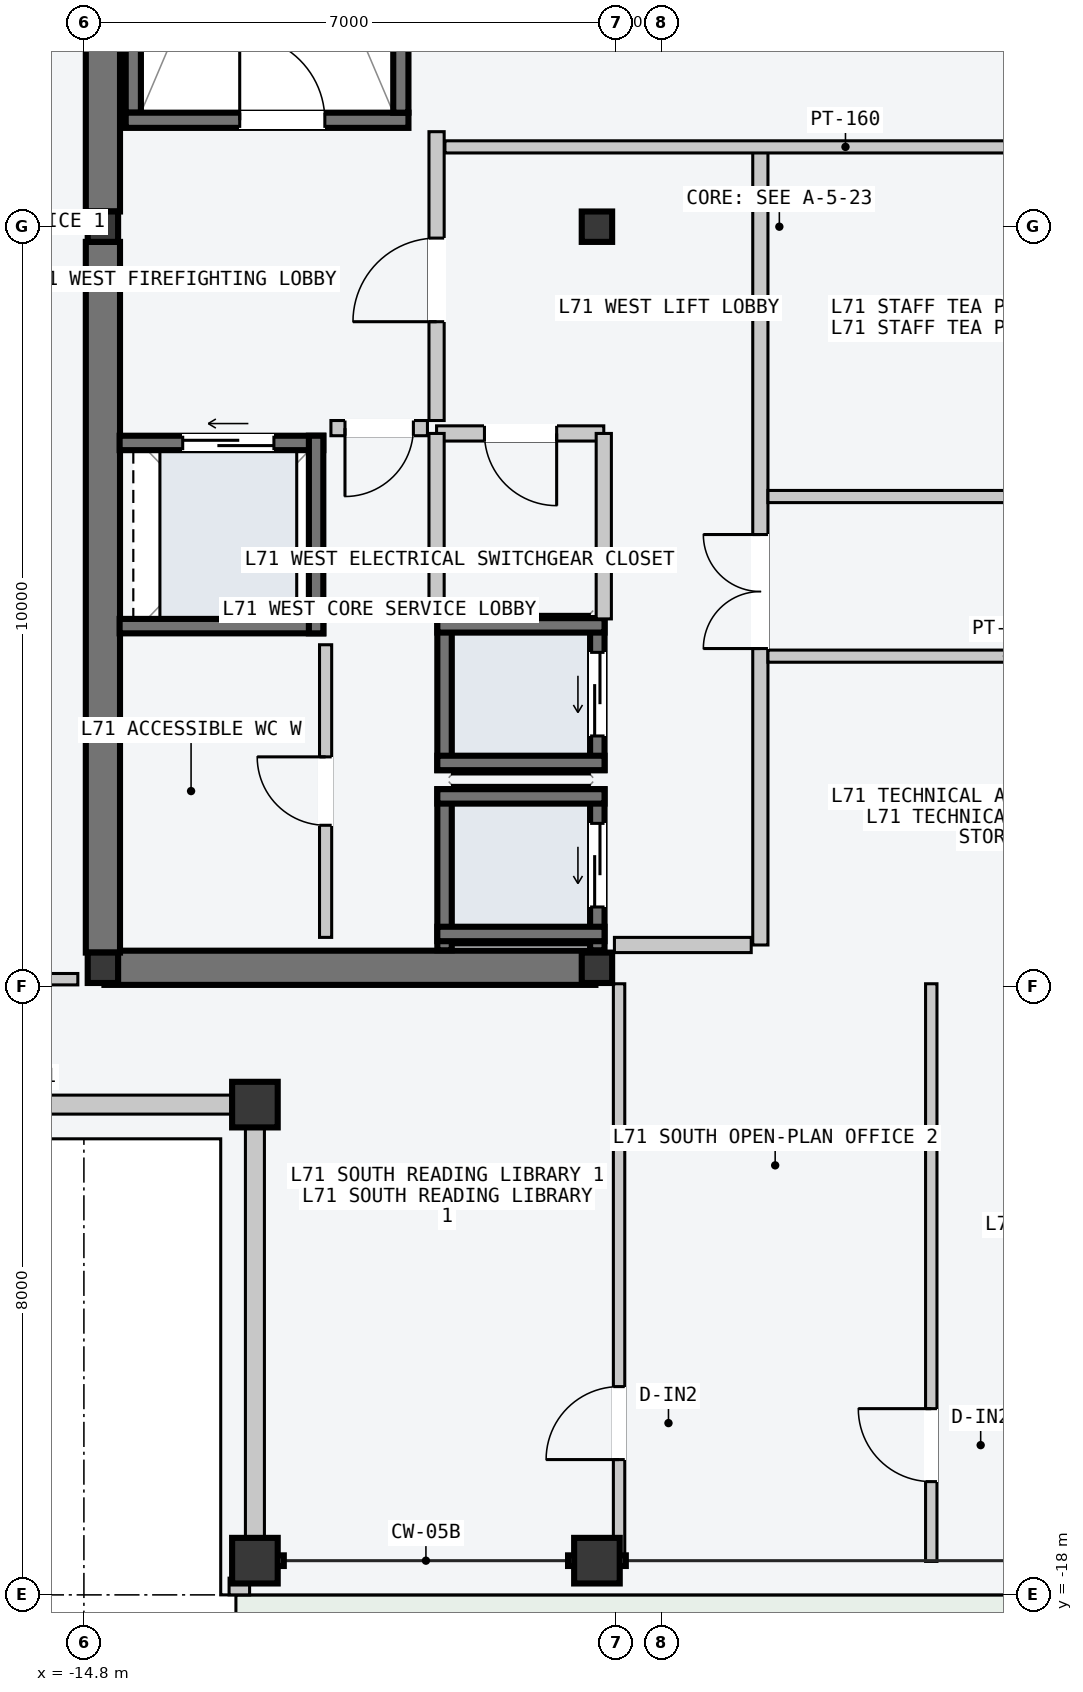
"""IFC4 building model, lengths in metres.
Left out: names, types, materials, properties, quantities, classifications, styles, units other than length and angle.
Written with IfcOpenShell. Run it as: python <this file> out.ifc"""

import sys

from ifc_helpers import new_model, si_unit, direction, frame, frame_2d, origin, origin_2d, place, context, subcontext, project, spatial, rectangle, hollow_rectangle, i_section, extrude, element, fill, save


model = new_model("IFC4")
c1 = context("Model", 3, precision=1e-05, world=origin(), true_north=direction((0.0, 1.0)))
c2 = subcontext(c1, "Body", "Model", "MODEL_VIEW")
j1 = project(units=[si_unit("LENGTHUNIT", "METRE"), si_unit("PLANEANGLEUNIT", "RADIAN")], contexts=[c1])
p1 = place(None, origin())
s1 = spatial("IfcSite", under=j1, at=p1, CompositionType="ELEMENT")
p2 = place(p1, origin())
s2 = spatial("IfcBuilding", under=s1, at=p2, CompositionType="ELEMENT")
p3 = place(p2, frame((0.0, 0.0, 268.8)))
s3 = spatial("IfcBuildingStorey", under=s2, at=p3, CompositionType="ELEMENT", Elevation=268.8)
p4 = place(p3, frame((-14.53, -9.75, -0.2), z_axis=(0.0, 0.0, 1.0), x_axis=(1.0, 0.0, 0.0)))
e1 = element("IfcWall", 1, at=p4, inside=s3, PredefinedType="SHEAR", context=c2, shape_type="SweptSolid", body=[
    extrude(rectangle(XDim=6.46, YDim=0.45, at=frame_2d((3.23, 0.0))), origin(), (0.0, 0.0, 1.0), 3.6),
])
for number, where, z_axis, x_axis in (
    (2, (-14.55, -9.55, -0.2), (0.0, 0.0, 1.0), (0.0, 1.0, 0.0)),
    (3, (-14.55, 0.2, -0.2), (0.0, 0.0, 1.0), (0.0, 1.0, 0.0)),
):
    element("IfcWall", number, at=place(p3, frame(where, z_axis=z_axis, x_axis=x_axis)), inside=s3, PredefinedType="SHEAR", context=c2, shape_type="SweptSolid", body=[
        extrude(rectangle(XDim=9.35, YDim=0.45, at=frame_2d((4.675, 0.0))), origin(), (0.0, 0.0, 1.0), 3.6),
    ])
p5 = place(p3, frame((-14.15, 1.5, -0.2), z_axis=(0.0, 0.0, 1.0), x_axis=(0.0, 1.0, 0.0)))
e4 = element("IfcWall", 4, at=p5, inside=s3, PredefinedType="SOLIDWALL", context=c2, shape_type="SweptSolid", body=[
    extrude(rectangle(XDim=7.8, YDim=0.2, at=frame_2d((3.9, 0.0))), origin(), (0.0, 0.0, 1.0), 3.6),
])
p6 = place(p3, frame((-14.25, 1.4, -0.2), z_axis=(0.0, 0.0, 1.0), x_axis=(1.0, 0.0, 0.0)))
e5 = element("IfcWall", 5, at=p6, inside=s3, PredefinedType="SOLIDWALL", context=c2, shape_type="SweptSolid", body=[
    extrude(rectangle(XDim=3.72, YDim=0.2, at=frame_2d((1.86, 0.0))), origin(), (0.0, 0.0, 1.0), 3.6),
])
p7 = place(p6, frame((1.5, 0.0, 0.2)))
e6 = element("IfcOpeningElement", 6, at=p7, cuts=e5, PredefinedType="OPENING", context=c2, shape_type="SweptSolid", body=[
    extrude(rectangle(XDim=1.12, YDim=2.18, at=frame_2d((0.56, 1.09))), frame((0.0, 0.11, 0.0), z_axis=(0.0, -1.0, 0.0), x_axis=(1.0, 0.0, 0.0)), (0.0, 0.0, 1.0), 0.22),
])
p8 = place(p3, frame((-10.63, 1.5, -0.2), z_axis=(0.0, 0.0, 1.0), x_axis=(0.0, 1.0, 0.0)))
e7 = element("IfcWall", 7, at=p8, inside=s3, PredefinedType="SOLIDWALL", context=c2, shape_type="SweptSolid", body=[
    extrude(rectangle(XDim=7.8, YDim=0.2, at=frame_2d((3.9, 0.0))), origin(), (0.0, 0.0, 1.0), 3.6),
])
for number, where, z_axis, x_axis in (
    (8, (-14.55, -9.75, 0.0), (0.0, 0.0, 1.0), (1.0, 0.0, 0.0)),
    (9, (-14.55, 0.0, 0.0), (0.0, 0.0, 1.0), (1.0, 0.0, 0.0)),
    (10, (-8.05, -9.75, 0.0), (0.0, 0.0, 1.0), (1.0, 0.0, 0.0)),
    (11, (-8.05, 0.0, 0.0), (0.0, 0.0, 1.0), (1.0, 0.0, 0.0)),
):
    element("IfcColumn", number, at=place(p3, frame(where, z_axis=z_axis, x_axis=x_axis)), inside=s3, PredefinedType="COLUMN", context=c2, shape_type="SweptSolid", body=[
        extrude(i_section(OverallWidth=0.4, OverallDepth=0.4, WebThickness=0.013, FlangeThickness=0.021, at=origin_2d()), origin(), (0.0, 0.0, 1.0), 3.6),
    ])
for number, where, z_axis, x_axis in (
    (12, (-12.55, -17.55, 0.0), (0.0, 0.0, 1.0), (1.0, 0.0, 0.0)),
    (13, (-8.05, -17.55, 0.0), (0.0, 0.0, 1.0), (1.0, 0.0, 0.0)),
    (14, (-12.55, -11.55, 0.0), (0.0, 0.0, 1.0), (1.0, 0.0, 0.0)),
):
    element("IfcColumn", number, at=place(p3, frame(where, z_axis=z_axis, x_axis=x_axis)), inside=s3, PredefinedType="COLUMN", context=c2, shape_type="SweptSolid", body=[
        extrude(hollow_rectangle(XDim=0.6, YDim=0.6, WallThickness=0.025, at=origin_2d()), origin(), (0.0, 0.0, 1.0), 3.6),
    ])
for number, where, z_axis, x_axis in (
    (15, (-18.24, -11.55, 0.0), (0.0, 0.0, 1.0), (1.0, 0.0, 0.0)),
    (16, (-12.55, -17.24, 0.0), (0.0, 0.0, 1.0), (0.0, 1.0, 0.0)),
):
    element("IfcWall", number, at=place(p3, frame(where, z_axis=z_axis, x_axis=x_axis)), inside=s3, PredefinedType="STANDARD", context=c2, shape_type="SweptSolid", body=[
        extrude(rectangle(XDim=5.38, YDim=0.25, at=frame_2d((2.69, 0.0))), origin(), (0.0, 0.0, 1.0), 2.85),
    ])
p9 = place(p3, frame((-12.89, -17.89, 0.0), z_axis=(0.0, 0.0, 1.0), x_axis=(1.0, 0.0, 0.0)))
e17 = element("IfcWall", 17, at=p9, inside=s3, PredefinedType="PARAPET", context=c2, shape_type="SweptSolid", body=[
    extrude(rectangle(XDim=0.27, YDim=0.22, at=frame_2d((0.135, 0.0))), origin(), (0.0, 0.0, 1.0), 1.2),
])
p10 = place(p3, frame((-8.045, -9.52, -0.2), z_axis=(0.0, 0.0, 1.0), x_axis=(0.0, 1.0, 0.0)))
e18 = element("IfcWall", 18, at=p10, inside=s3, PredefinedType="SOLIDWALL", context=c2, shape_type="SweptSolid", body=[
    extrude(rectangle(XDim=2.12, YDim=0.19, at=frame_2d((1.06, 0.0))), origin(), (0.0, 0.0, 1.0), 3.6),
])
p11 = place(p10, frame((0.57, 0.0, 0.2)))
e19 = element("IfcOpeningElement", 19, at=p11, cuts=e18, PredefinedType="OPENING", context=c2, shape_type="SweptSolid", body=[
    extrude(rectangle(XDim=1.1, YDim=2.2, at=frame_2d((0.55, 1.1))), frame((0.0, 0.105, 0.0), z_axis=(0.0, -1.0, 0.0), x_axis=(1.0, 0.0, 0.0)), (0.0, 0.0, 1.0), 0.21),
])
p12 = place(p3, frame((-10.055, -9.52, -0.2), z_axis=(0.0, 0.0, 1.0), x_axis=(0.0, 1.0, 0.0)))
e20 = element("IfcWall", 20, at=p12, inside=s3, PredefinedType="SOLIDWALL", context=c2, shape_type="SweptSolid", body=[
    extrude(rectangle(XDim=2.12, YDim=0.19, at=frame_2d((1.06, 0.0))), origin(), (0.0, 0.0, 1.0), 3.6),
])
for number, where, z_axis, x_axis in (
    (21, (-10.15, -7.495, -0.2), (0.0, 0.0, 1.0), (1.0, 0.0, 0.0)),
    (22, (-10.15, -9.305, -0.2), (0.0, 0.0, 1.0), (1.0, 0.0, 0.0)),
):
    element("IfcWall", number, at=place(p3, frame(where, z_axis=z_axis, x_axis=x_axis)), inside=s3, PredefinedType="SOLIDWALL", context=c2, shape_type="SweptSolid", body=[
        extrude(rectangle(XDim=2.2, YDim=0.19, at=frame_2d((1.1, 0.0))), origin(), (0.0, 0.0, 1.0), 3.6),
    ])
p13 = place(p3, frame((-8.045, -7.15, -0.2), z_axis=(0.0, 0.0, 1.0), x_axis=(0.0, 1.0, 0.0)))
e23 = element("IfcWall", 23, at=p13, inside=s3, PredefinedType="SOLIDWALL", context=c2, shape_type="SweptSolid", body=[
    extrude(rectangle(XDim=2.0, YDim=0.19, at=frame_2d((1.0, 0.0))), origin(), (0.0, 0.0, 1.0), 3.6),
])
p14 = place(p13, frame((0.45, 0.0, 0.2)))
e24 = element("IfcOpeningElement", 24, at=p14, cuts=e23, PredefinedType="OPENING", context=c2, shape_type="SweptSolid", body=[
    extrude(rectangle(XDim=1.1, YDim=2.2, at=frame_2d((0.55, 1.1))), frame((0.0, 0.105, 0.0), z_axis=(0.0, -1.0, 0.0), x_axis=(1.0, 0.0, 0.0)), (0.0, 0.0, 1.0), 0.21),
])
p15 = place(p3, frame((-10.055, -7.15, -0.2), z_axis=(0.0, 0.0, 1.0), x_axis=(0.0, 1.0, 0.0)))
e25 = element("IfcWall", 25, at=p15, inside=s3, PredefinedType="SOLIDWALL", context=c2, shape_type="SweptSolid", body=[
    extrude(rectangle(XDim=2.0, YDim=0.19, at=frame_2d((1.0, 0.0))), origin(), (0.0, 0.0, 1.0), 3.6),
])
for number, where, z_axis, x_axis in (
    (26, (-10.15, -5.245, -0.2), (0.0, 0.0, 1.0), (1.0, 0.0, 0.0)),
    (27, (-10.15, -7.055, -0.2), (0.0, 0.0, 1.0), (1.0, 0.0, 0.0)),
):
    element("IfcWall", number, at=place(p3, frame(where, z_axis=z_axis, x_axis=x_axis)), inside=s3, PredefinedType="SOLIDWALL", context=c2, shape_type="SweptSolid", body=[
        extrude(rectangle(XDim=2.2, YDim=0.19, at=frame_2d((1.1, 0.0))), origin(), (0.0, 0.0, 1.0), 3.6),
    ])
p16 = place(p3, frame((-14.33, -2.845, -0.2), z_axis=(0.0, 0.0, 1.0), x_axis=(1.0, 0.0, 0.0)))
e28 = element("IfcWall", 28, at=p16, inside=s3, PredefinedType="SOLIDWALL", context=c2, shape_type="SweptSolid", body=[
    extrude(rectangle(XDim=2.68, YDim=0.19, at=frame_2d((1.34, 0.0))), origin(), (0.0, 0.0, 1.0), 3.6),
])
p17 = place(p16, frame((0.83, 0.0, 0.2)))
e29 = element("IfcOpeningElement", 29, at=p17, cuts=e28, PredefinedType="OPENING", context=c2, shape_type="SweptSolid", body=[
    extrude(rectangle(XDim=1.2, YDim=2.2, at=frame_2d((0.6, 1.1))), frame((0.0, 0.105, 0.0), z_axis=(0.0, -1.0, 0.0), x_axis=(1.0, 0.0, 0.0)), (0.0, 0.0, 1.0), 0.21),
])
p18 = place(p3, frame((-14.33, -5.255, -0.2), z_axis=(0.0, 0.0, 1.0), x_axis=(1.0, 0.0, 0.0)))
e30 = element("IfcWall", 30, at=p18, inside=s3, PredefinedType="SOLIDWALL", context=c2, shape_type="SweptSolid", body=[
    extrude(rectangle(XDim=2.68, YDim=0.19, at=frame_2d((1.34, 0.0))), origin(), (0.0, 0.0, 1.0), 3.6),
])
p19 = place(p3, frame((-11.745, -5.35, -0.2), z_axis=(0.0, 0.0, 1.0), x_axis=(0.0, 1.0, 0.0)))
e31 = element("IfcWall", 31, at=p19, inside=s3, PredefinedType="SOLIDWALL", context=c2, shape_type="SweptSolid", body=[
    extrude(rectangle(XDim=2.6, YDim=0.19, at=frame_2d((1.3, 0.0))), origin(), (0.0, 0.0, 1.0), 3.6),
])
p20 = place(p3, frame((-5.9, -9.45, 0.0), z_axis=(0.0, 0.0, 1.0), x_axis=(0.0, 1.0, 0.0)))
e32 = element("IfcWall", 32, at=p20, inside=s3, PredefinedType="PARTITIONING", context=c2, shape_type="SweptSolid", body=[
    extrude(rectangle(XDim=10.5, YDim=0.2, at=frame_2d((5.25, 0.0))), origin(), (0.0, 0.0, 1.0), 3.4),
])
p21 = place(p20, frame((3.9, 0.0, 0.0)))
e33 = element("IfcOpeningElement", 33, at=p21, cuts=e32, PredefinedType="OPENING", context=c2, shape_type="SweptSolid", body=[
    extrude(rectangle(XDim=1.5, YDim=2.2, at=frame_2d((0.75, 1.1))), frame((0.0, 0.11, 0.0), z_axis=(0.0, -1.0, 0.0), x_axis=(1.0, 0.0, 0.0)), (0.0, 0.0, 1.0), 0.22),
])
p22 = place(p3, frame((-6.02, -9.45, 0.0), z_axis=(0.0, 0.0, 1.0), x_axis=(-1.0, 0.0, 0.0)))
e34 = element("IfcWall", 34, at=p22, inside=s3, PredefinedType="PARTITIONING", context=c2, shape_type="SweptSolid", body=[
    extrude(rectangle(XDim=1.8, YDim=0.2, at=frame_2d((0.9, 0.0))), origin(), (0.0, 0.0, 1.0), 3.4),
])
p23 = place(p3, frame((-10.16, -2.55, 0.0), z_axis=(0.0, 0.0, 1.0), x_axis=(0.0, 1.0, 0.0)))
e35 = element("IfcWall", 35, at=p23, inside=s3, PredefinedType="PARTITIONING", context=c2, shape_type="SweptSolid", body=[
    extrude(rectangle(XDim=3.8, YDim=0.2, at=frame_2d((1.9, 0.0))), origin(), (0.0, 0.0, 1.0), 3.4),
])
p24 = place(p23, frame((1.3, 0.0, 0.0)))
e36 = element("IfcOpeningElement", 36, at=p24, cuts=e35, PredefinedType="OPENING", context=c2, shape_type="SweptSolid", body=[
    extrude(rectangle(XDim=1.1, YDim=2.15, at=frame_2d((0.55, 1.075))), frame((0.0, 0.11, 0.0), z_axis=(0.0, -1.0, 0.0), x_axis=(1.0, 0.0, 0.0)), (0.0, 0.0, 1.0), 0.22),
])
p25 = place(p3, frame((-10.28, -2.65, 0.0), z_axis=(0.0, 0.0, 1.0), x_axis=(-1.0, 0.0, 0.0)))
e37 = element("IfcWall", 37, at=p25, inside=s3, PredefinedType="PARTITIONING", context=c2, shape_type="SweptSolid", body=[
    extrude(rectangle(XDim=1.27, YDim=0.2, at=frame_2d((0.635, 0.0))), origin(), (0.0, 0.0, 1.0), 3.4),
])
p26 = place(p25, frame((0.185, 0.0, 0.0)))
e38 = element("IfcOpeningElement", 38, at=p26, cuts=e37, PredefinedType="OPENING", context=c2, shape_type="SweptSolid", body=[
    extrude(rectangle(XDim=0.9, YDim=2.15, at=frame_2d((0.45, 1.075))), frame((0.0, 0.11, 0.0), z_axis=(0.0, -1.0, 0.0), x_axis=(1.0, 0.0, 0.0)), (0.0, 0.0, 1.0), 0.22),
])
p27 = place(p3, frame((-7.96, -2.72, 0.0), z_axis=(0.0, 0.0, 1.0), x_axis=(-1.0, 0.0, 0.0)))
e39 = element("IfcWall", 39, at=p27, inside=s3, PredefinedType="PARTITIONING", context=c2, shape_type="SweptSolid", body=[
    extrude(rectangle(XDim=2.2, YDim=0.2, at=frame_2d((1.1, 0.0))), origin(), (0.0, 0.0, 1.0), 3.4),
])
p28 = place(p27, frame((0.62, 0.0, 0.0)))
e40 = element("IfcOpeningElement", 40, at=p28, cuts=e39, PredefinedType="OPENING", context=c2, shape_type="SweptSolid", body=[
    extrude(rectangle(XDim=0.95, YDim=2.1, at=frame_2d((0.475, 1.05))), frame((0.0, 0.11, 0.0), z_axis=(0.0, -1.0, 0.0), x_axis=(1.0, 0.0, 0.0)), (0.0, 0.0, 1.0), 0.22),
])
for number, where, z_axis, x_axis in (
    (41, (-7.96, -5.16, 0.0), (0.0, 0.0, 1.0), (0.0, 1.0, 0.0)),
    (42, (-10.16, -5.16, 0.0), (0.0, 0.0, 1.0), (0.0, 1.0, 0.0)),
):
    element("IfcWall", number, at=place(p3, frame(where, z_axis=z_axis, x_axis=x_axis)), inside=s3, PredefinedType="PARTITIONING", context=c2, shape_type="SweptSolid", body=[
        extrude(rectangle(XDim=2.44, YDim=0.2, at=frame_2d((1.22, 0.0))), origin(), (0.0, 0.0, 1.0), 3.4),
    ])
p29 = place(p3, frame((-11.62, -9.35, 0.0), z_axis=(0.0, 0.0, 1.0), x_axis=(0.0, 1.0, 0.0)))
e43 = element("IfcWall", 43, at=p29, inside=s3, PredefinedType="PARTITIONING", context=c2, shape_type="SweptSolid", body=[
    extrude(rectangle(XDim=3.85, YDim=0.16, at=frame_2d((1.925, 0.0))), origin(), (0.0, 0.0, 1.0), 3.4),
])
p30 = place(p29, frame((1.475, 0.0, 0.0)))
e44 = element("IfcOpeningElement", 44, at=p30, cuts=e43, PredefinedType="OPENING", context=c2, shape_type="SweptSolid", body=[
    extrude(rectangle(XDim=0.9, YDim=2.15, at=frame_2d((0.45, 1.075))), frame((0.0, 0.09, 0.0), z_axis=(0.0, -1.0, 0.0), x_axis=(1.0, 0.0, 0.0)), (0.0, 0.0, 1.0), 0.18),
])
p31 = place(p3, frame((-10.05, 1.05, 0.0), z_axis=(0.0, 0.0, 1.0), x_axis=(1.0, 0.0, 0.0)))
e45 = element("IfcWall", 45, at=p31, inside=s3, PredefinedType="PARTITIONING", context=c2, shape_type="SweptSolid", body=[
    extrude(rectangle(XDim=10.54, YDim=0.16, at=frame_2d((5.27, 0.0))), origin(), (0.0, 0.0, 1.0), 3.4),
])
for number, where, z_axis, x_axis in (
    (46, (-5.8, -3.55, 0.0), (0.0, 0.0, 1.0), (1.0, 0.0, 0.0)),
    (47, (-5.8, -5.65, 0.0), (0.0, 0.0, 1.0), (1.0, 0.0, 0.0)),
):
    element("IfcWall", number, at=place(p3, frame(where, z_axis=z_axis, x_axis=x_axis)), inside=s3, PredefinedType="PARTITIONING", context=c2, shape_type="SweptSolid", body=[
        extrude(rectangle(XDim=6.29, YDim=0.16, at=frame_2d((3.145, 0.0))), origin(), (0.0, 0.0, 1.0), 3.4),
    ])
p32 = place(p3, frame((-7.759, -17.56, 0.0), z_axis=(0.0, 0.0, 1.0), x_axis=(0.0, 1.0, 0.0)))
e48 = element("IfcWall", 48, at=p32, inside=s3, PredefinedType="PARTITIONING", context=c2, shape_type="SweptSolid", body=[
    extrude(rectangle(XDim=7.6, YDim=0.15, at=frame_2d((3.8, 0.0))), origin(), (0.0, 0.0, 1.0), 3.4),
])
p33 = place(p32, frame((1.34, 0.0, 0.0)))
e49 = element("IfcOpeningElement", 49, at=p33, cuts=e48, PredefinedType="OPENING", context=c2, shape_type="SweptSolid", body=[
    extrude(rectangle(XDim=0.96, YDim=2.18, at=frame_2d((0.48, 1.09))), frame((0.0, 0.085, 0.0), z_axis=(0.0, -1.0, 0.0), x_axis=(1.0, 0.0, 0.0)), (0.0, 0.0, 1.0), 0.17),
])
p34 = place(p3, frame((-3.651, -17.56, 0.0), z_axis=(0.0, 0.0, 1.0), x_axis=(0.0, 1.0, 0.0)))
e50 = element("IfcWall", 50, at=p34, inside=s3, PredefinedType="PARTITIONING", context=c2, shape_type="SweptSolid", body=[
    extrude(rectangle(XDim=7.6, YDim=0.15, at=frame_2d((3.8, 0.0))), origin(), (0.0, 0.0, 1.0), 3.4),
])
p35 = place(p34, frame((1.05, 0.0, 0.0)))
e51 = element("IfcOpeningElement", 51, at=p35, cuts=e50, PredefinedType="OPENING", context=c2, shape_type="SweptSolid", body=[
    extrude(rectangle(XDim=0.96, YDim=2.18, at=frame_2d((0.48, 1.09))), frame((0.0, 0.085, 0.0), z_axis=(0.0, -1.0, 0.0), x_axis=(1.0, 0.0, 0.0)), (0.0, 0.0, 1.0), 0.17),
])
p36 = place(p3, frame((-18.56, -9.9, 0.0), z_axis=(0.0, 0.0, 1.0), x_axis=(1.0, 0.0, 0.0)))
e52 = element("IfcWall", 52, at=p36, inside=s3, PredefinedType="PARTITIONING", context=c2, shape_type="SweptSolid", body=[
    extrude(rectangle(XDim=3.68, YDim=0.15, at=frame_2d((1.84, 0.0))), origin(), (0.0, 0.0, 1.0), 3.4),
])
p37 = place(p36, frame((1.36, 0.0, 0.0)))
e53 = element("IfcOpeningElement", 53, at=p37, cuts=e52, PredefinedType="OPENING", context=c2, shape_type="SweptSolid", body=[
    extrude(rectangle(XDim=0.96, YDim=2.18, at=frame_2d((0.48, 1.09))), frame((0.0, 0.085, 0.0), z_axis=(0.0, -1.0, 0.0), x_axis=(1.0, 0.0, 0.0)), (0.0, 0.0, 1.0), 0.17),
])
p38 = place(p7, origin())
e54 = element("IfcDoor", 54, at=p38, inside=s3, OperationType="SINGLE_SWING_LEFT", PredefinedType="DOOR", context=c2, shape_type="SweptSolid", body=[
    extrude(rectangle(XDim=1.12, YDim=2.18, at=frame_2d((0.56, 1.09))), frame((0.0, 0.025, 0.0), z_axis=(0.0, -1.0, 0.0), x_axis=(1.0, 0.0, 0.0)), (0.0, 0.0, 1.0), 0.05),
])
fill(e6, e54)
p39 = place(p11, origin())
e55 = element("IfcDoor", 55, at=p39, inside=s3, OperationType="SLIDING_TO_LEFT", PredefinedType="DOOR", context=c2, shape_type="SweptSolid", body=[
    extrude(rectangle(XDim=1.1, YDim=2.2, at=frame_2d((0.55, 1.1))), frame((0.0, 0.025, 0.0), z_axis=(0.0, -1.0, 0.0), x_axis=(1.0, 0.0, 0.0)), (0.0, 0.0, 1.0), 0.05),
])
fill(e19, e55)
p40 = place(p14, origin())
e56 = element("IfcDoor", 56, at=p40, inside=s3, OperationType="SLIDING_TO_LEFT", PredefinedType="DOOR", context=c2, shape_type="SweptSolid", body=[
    extrude(rectangle(XDim=1.1, YDim=2.2, at=frame_2d((0.55, 1.1))), frame((0.0, 0.025, 0.0), z_axis=(0.0, -1.0, 0.0), x_axis=(1.0, 0.0, 0.0)), (0.0, 0.0, 1.0), 0.05),
])
fill(e24, e56)
p41 = place(p17, origin())
e57 = element("IfcDoor", 57, at=p41, inside=s3, OperationType="SLIDING_TO_LEFT", PredefinedType="DOOR", context=c2, shape_type="SweptSolid", body=[
    extrude(rectangle(XDim=1.2, YDim=2.2, at=frame_2d((0.6, 1.1))), frame((0.0, 0.025, 0.0), z_axis=(0.0, -1.0, 0.0), x_axis=(1.0, 0.0, 0.0)), (0.0, 0.0, 1.0), 0.05),
])
fill(e29, e57)
p42 = place(p21, origin())
e58 = element("IfcDoor", 58, at=p42, inside=s3, OperationType="DOUBLE_DOOR_SINGLE_SWING", PredefinedType="DOOR", context=c2, shape_type="SweptSolid", body=[
    extrude(rectangle(XDim=1.5, YDim=2.2, at=frame_2d((0.75, 1.1))), frame((0.0, 0.025, 0.0), z_axis=(0.0, -1.0, 0.0), x_axis=(1.0, 0.0, 0.0)), (0.0, 0.0, 1.0), 0.05),
])
fill(e33, e58)
p43 = place(p24, origin())
e59 = element("IfcDoor", 59, at=p43, inside=s3, OperationType="SINGLE_SWING_LEFT", PredefinedType="DOOR", context=c2, shape_type="SweptSolid", body=[
    extrude(rectangle(XDim=1.1, YDim=2.15, at=frame_2d((0.55, 1.075))), frame((0.0, 0.025, 0.0), z_axis=(0.0, -1.0, 0.0), x_axis=(1.0, 0.0, 0.0)), (0.0, 0.0, 1.0), 0.05),
])
fill(e36, e59)
p44 = place(p26, origin())
e60 = element("IfcDoor", 60, at=p44, inside=s3, OperationType="SINGLE_SWING_RIGHT", PredefinedType="DOOR", context=c2, shape_type="SweptSolid", body=[
    extrude(rectangle(XDim=0.9, YDim=2.15, at=frame_2d((0.45, 1.075))), frame((0.0, 0.025, 0.0), z_axis=(0.0, -1.0, 0.0), x_axis=(1.0, 0.0, 0.0)), (0.0, 0.0, 1.0), 0.05),
])
fill(e38, e60)
p45 = place(p28, origin())
e61 = element("IfcDoor", 61, at=p45, inside=s3, OperationType="SINGLE_SWING_LEFT", PredefinedType="DOOR", context=c2, shape_type="SweptSolid", body=[
    extrude(rectangle(XDim=0.95, YDim=2.1, at=frame_2d((0.475, 1.05))), frame((0.0, 0.025, 0.0), z_axis=(0.0, -1.0, 0.0), x_axis=(1.0, 0.0, 0.0)), (0.0, 0.0, 1.0), 0.05),
])
fill(e40, e61)
p46 = place(p30, origin())
e62 = element("IfcDoor", 62, at=p46, inside=s3, OperationType="SINGLE_SWING_RIGHT", PredefinedType="DOOR", context=c2, shape_type="SweptSolid", body=[
    extrude(rectangle(XDim=0.9, YDim=2.15, at=frame_2d((0.45, 1.075))), frame((0.0, 0.025, 0.0), z_axis=(0.0, -1.0, 0.0), x_axis=(1.0, 0.0, 0.0)), (0.0, 0.0, 1.0), 0.05),
])
fill(e44, e62)
p47 = place(p33, origin())
e63 = element("IfcDoor", 63, at=p47, inside=s3, OperationType="SINGLE_SWING_LEFT", PredefinedType="DOOR", context=c2, shape_type="SweptSolid", body=[
    extrude(rectangle(XDim=0.96, YDim=2.18, at=frame_2d((0.48, 1.09))), frame((0.0, 0.025, 0.0), z_axis=(0.0, -1.0, 0.0), x_axis=(1.0, 0.0, 0.0)), (0.0, 0.0, 1.0), 0.05),
])
fill(e49, e63)
p48 = place(p35, origin())
e64 = element("IfcDoor", 64, at=p48, inside=s3, OperationType="SINGLE_SWING_RIGHT", PredefinedType="DOOR", context=c2, shape_type="SweptSolid", body=[
    extrude(rectangle(XDim=0.96, YDim=2.18, at=frame_2d((0.48, 1.09))), frame((0.0, 0.025, 0.0), z_axis=(0.0, -1.0, 0.0), x_axis=(1.0, 0.0, 0.0)), (0.0, 0.0, 1.0), 0.05),
])
fill(e51, e64)
save(model, sys.argv[1])
